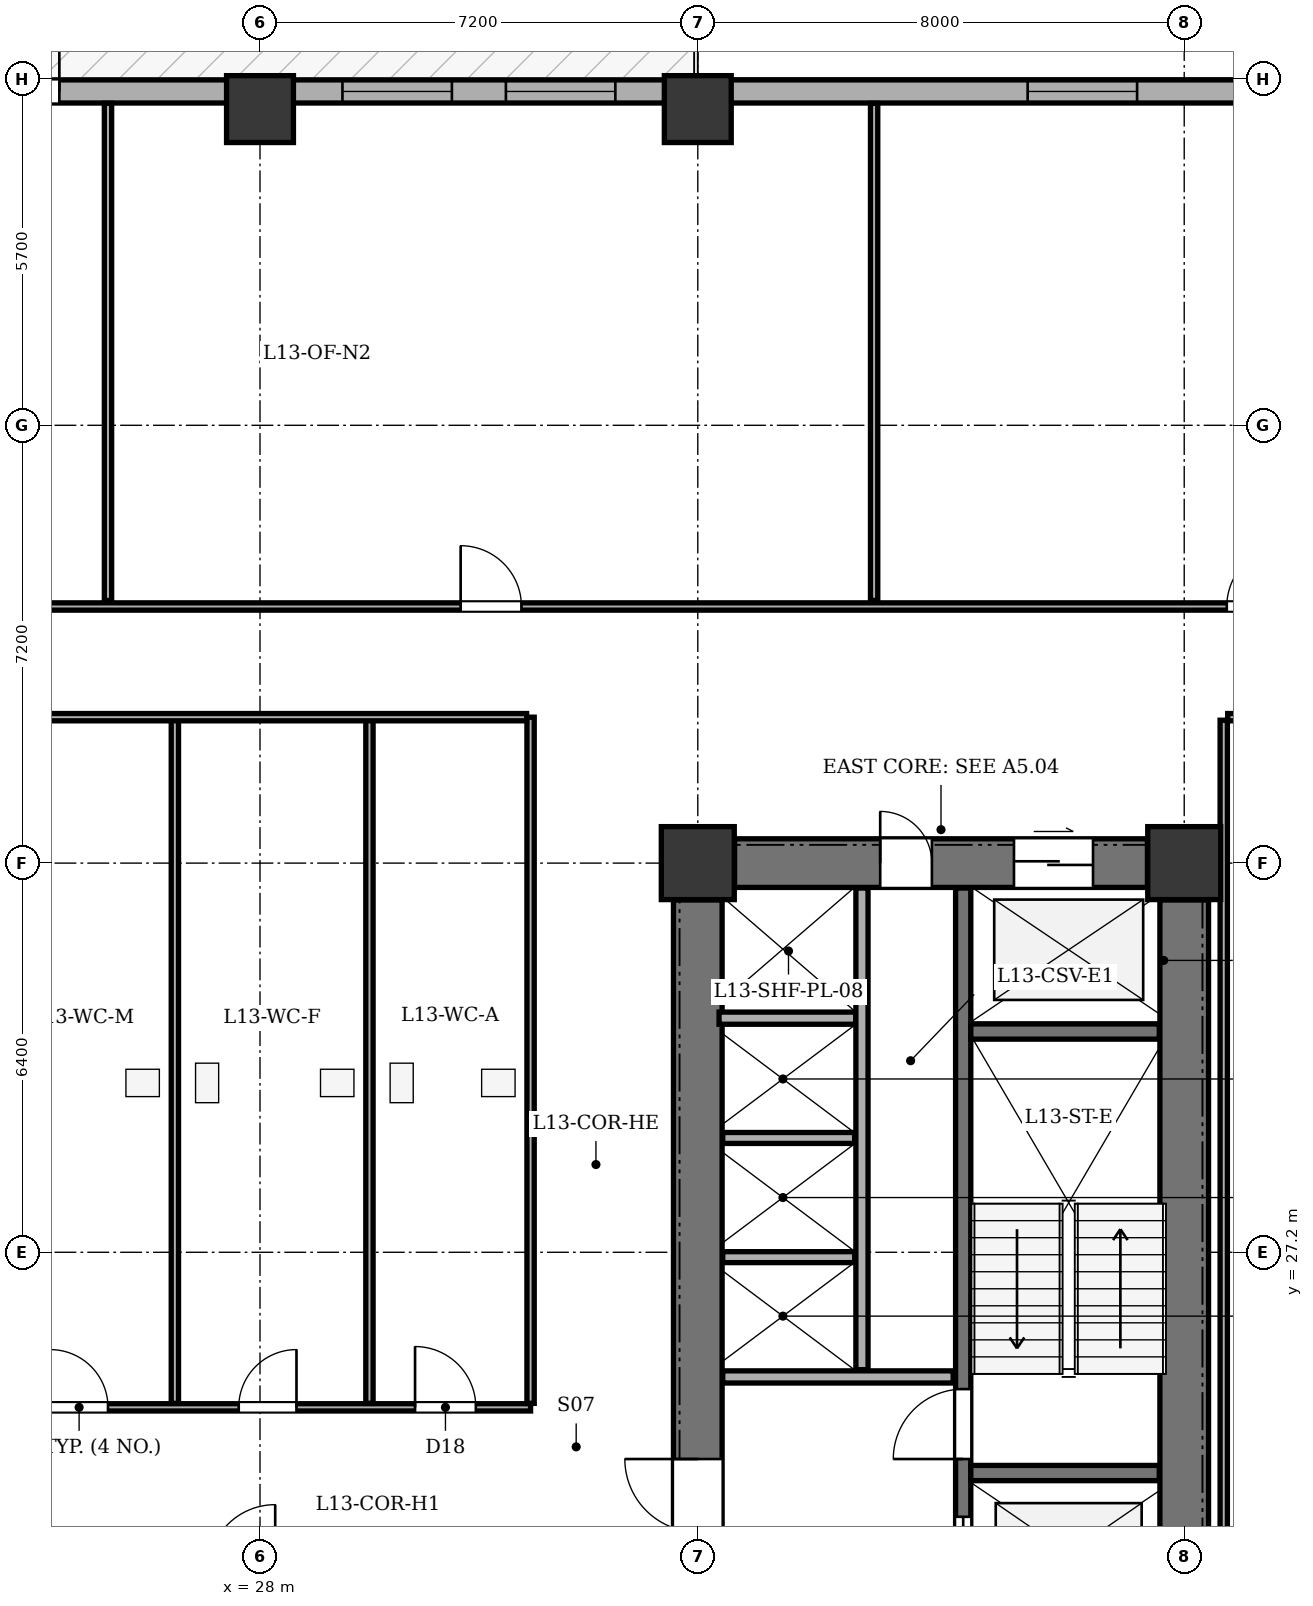
"""IFC4 building model, lengths in metres.
Left out: names, types, materials, properties, quantities, classifications, styles, units other than length and angle.
Written with IfcOpenShell. Run it as: python <this file> out.ifc"""

import sys

from ifc_helpers import new_model, si_unit, direction, frame, frame_2d, origin, origin_2d, place, context, subcontext, project, spatial, rectangle, extrude, element, fill, save


model = new_model("IFC4")
c1 = context("Model", 3, precision=1e-05, world=origin(), true_north=direction((0.0, 1.0)))
c2 = subcontext(c1, "Body", "Model", "MODEL_VIEW")
j1 = project(units=[si_unit("LENGTHUNIT", "METRE"), si_unit("PLANEANGLEUNIT", "RADIAN")], contexts=[c1])
p1 = place(None, origin())
s1 = spatial("IfcSite", under=j1, at=p1, CompositionType="ELEMENT")
p2 = place(p1, origin())
s2 = spatial("IfcBuilding", under=s1, at=p2, CompositionType="ELEMENT")
p3 = place(p2, frame((0.0, 0.0, 55.5)))
s3 = spatial("IfcBuildingStorey", under=s2, at=p3, CompositionType="ELEMENT", Elevation=55.5)
for number, where, z_axis, x_axis in (
    (1, (35.2, 33.6, 0.0), (0.0, 0.0, 1.0), (1.0, 0.0, 0.0)),
    (2, (43.2, 33.6, 0.0), (0.0, 0.0, 1.0), (1.0, 0.0, 0.0)),
):
    element("IfcColumn", number, at=place(p3, frame(where, z_axis=z_axis, x_axis=x_axis)), inside=s3, PredefinedType="COLUMN", context=c2, shape_type="SweptSolid", body=[
        extrude(rectangle(XDim=1.2, YDim=1.2, at=origin_2d()), origin(), (0.0, 0.0, 1.0), 3.9),
    ])
for number, where, z_axis, x_axis in (
    (3, (28.0, 46.0, 0.0), (0.0, 0.0, 1.0), (1.0, 0.0, 0.0)),
    (4, (35.2, 46.0, 0.0), (0.0, 0.0, 1.0), (1.0, 0.0, 0.0)),
):
    element("IfcColumn", number, at=place(p3, frame(where, z_axis=z_axis, x_axis=x_axis)), inside=s3, PredefinedType="COLUMN", context=c2, shape_type="SweptSolid", body=[
        extrude(rectangle(XDim=1.1, YDim=1.1, at=origin_2d()), origin(), (0.0, 0.0, 1.0), 3.9),
    ])
p4 = place(p3, frame((15.7, 46.29, 0.0), z_axis=(0.0, 0.0, 1.0), x_axis=(1.0, 0.0, 0.0)))
e5 = element("IfcWall", 5, at=p4, inside=s3, PredefinedType="STANDARD", context=c2, shape_type="SweptSolid", body=[
    extrude(rectangle(XDim=35.0, YDim=0.38, at=frame_2d((17.5, 0.0))), origin(), (0.0, 0.0, 1.0), 3.135),
])
p5 = place(p4, frame((8.0, 0.0, 0.0)))
e6 = element("IfcOpeningElement", 6, at=p5, cuts=e5, PredefinedType="OPENING", context=c2, shape_type="SweptSolid", body=[
    extrude(rectangle(XDim=1.0, YDim=2.02, at=frame_2d((0.5, 1.01))), frame((0.0, 0.2, 0.0), z_axis=(0.0, -1.0, 0.0), x_axis=(1.0, 0.0, 0.0)), (0.0, 0.0, 1.0), 0.4),
])
p6 = place(p4, frame((1.675, 0.0, 0.8)))
e7 = element("IfcOpeningElement", 7, at=p6, cuts=e5, PredefinedType="OPENING", context=c2, shape_type="SweptSolid", body=[
    extrude(rectangle(XDim=1.8, YDim=1.9, at=frame_2d((0.9, 0.95))), frame((0.0, 0.2, 0.0), z_axis=(0.0, -1.0, 0.0), x_axis=(1.0, 0.0, 0.0)), (0.0, 0.0, 1.0), 0.4),
])
p7 = place(p4, frame((13.656, 0.0, 0.8)))
e8 = element("IfcOpeningElement", 8, at=p7, cuts=e5, PredefinedType="OPENING", context=c2, shape_type="SweptSolid", body=[
    extrude(rectangle(XDim=1.8, YDim=1.9, at=frame_2d((0.9, 0.95))), frame((0.0, 0.2, 0.0), z_axis=(0.0, -1.0, 0.0), x_axis=(1.0, 0.0, 0.0)), (0.0, 0.0, 1.0), 0.4),
])
p8 = place(p4, frame((16.344, 0.0, 0.8)))
e9 = element("IfcOpeningElement", 9, at=p8, cuts=e5, PredefinedType="OPENING", context=c2, shape_type="SweptSolid", body=[
    extrude(rectangle(XDim=1.8, YDim=1.9, at=frame_2d((0.9, 0.95))), frame((0.0, 0.2, 0.0), z_axis=(0.0, -1.0, 0.0), x_axis=(1.0, 0.0, 0.0)), (0.0, 0.0, 1.0), 0.4),
])
p9 = place(p4, frame((24.925, 0.0, 0.8)))
e10 = element("IfcOpeningElement", 10, at=p9, cuts=e5, PredefinedType="OPENING", context=c2, shape_type="SweptSolid", body=[
    extrude(rectangle(XDim=1.8, YDim=1.9, at=frame_2d((0.9, 0.95))), frame((0.0, 0.2, 0.0), z_axis=(0.0, -1.0, 0.0), x_axis=(1.0, 0.0, 0.0)), (0.0, 0.0, 1.0), 0.4),
])
p10 = place(p4, frame((30.025, 0.0, 0.8)))
e11 = element("IfcOpeningElement", 11, at=p10, cuts=e5, PredefinedType="OPENING", context=c2, shape_type="SweptSolid", body=[
    extrude(rectangle(XDim=2.4, YDim=1.9, at=frame_2d((1.2, 0.95))), frame((0.0, 0.2, 0.0), z_axis=(0.0, -1.0, 0.0), x_axis=(1.0, 0.0, 0.0)), (0.0, 0.0, 1.0), 0.4),
])
p11 = place(p3, frame((43.2, 21.405, 0.0), z_axis=(0.0, 0.0, 1.0), x_axis=(0.0, 1.0, 0.0)))
e12 = element("IfcWall", 12, at=p11, inside=s3, PredefinedType="SHEAR", context=c2, shape_type="SweptSolid", body=[
    extrude(rectangle(XDim=11.59, YDim=0.8, at=frame_2d((5.795, 0.0))), origin(), (0.0, 0.0, 1.0), 3.6),
])
p12 = place(p3, frame((35.805, 33.6, 0.0), z_axis=(0.0, 0.0, 1.0), x_axis=(1.0, 0.0, 0.0)))
e13 = element("IfcWall", 13, at=p12, inside=s3, PredefinedType="SHEAR", context=c2, shape_type="SweptSolid", body=[
    extrude(rectangle(XDim=6.79, YDim=0.8, at=frame_2d((3.395, 0.0))), origin(), (0.0, 0.0, 1.0), 3.6),
])
p13 = place(p12, frame((4.595, 0.0, 0.0)))
e14 = element("IfcOpeningElement", 14, at=p13, cuts=e13, PredefinedType="OPENING", context=c2, shape_type="SweptSolid", body=[
    extrude(rectangle(XDim=1.3, YDim=2.15, at=frame_2d((0.65, 1.075))), frame((0.0, 0.41, 0.0), z_axis=(0.0, -1.0, 0.0), x_axis=(1.0, 0.0, 0.0)), (0.0, 0.0, 1.0), 0.82),
])
p14 = place(p12, frame((2.395, 0.0, 0.0)))
e15 = element("IfcOpeningElement", 15, at=p14, cuts=e13, PredefinedType="OPENING", context=c2, shape_type="SweptSolid", body=[
    extrude(rectangle(XDim=0.85, YDim=2.02, at=frame_2d((0.425, 1.01))), frame((0.0, 0.41, 0.0), z_axis=(0.0, -1.0, 0.0), x_axis=(1.0, 0.0, 0.0)), (0.0, 0.0, 1.0), 0.82),
])
p15 = place(p3, frame((35.2, 21.405, 0.0), z_axis=(0.0, 0.0, 1.0), x_axis=(0.0, 1.0, 0.0)))
e16 = element("IfcWall", 16, at=p15, inside=s3, PredefinedType="SHEAR", context=c2, shape_type="SweptSolid", body=[
    extrude(rectangle(XDim=11.59, YDim=0.8, at=frame_2d((5.795, 0.0))), origin(), (0.0, 0.0, 1.0), 3.6),
])
p16 = place(p15, frame((1.195, 0.0, 0.0)))
e17 = element("IfcOpeningElement", 17, at=p16, cuts=e16, PredefinedType="OPENING", context=c2, shape_type="SweptSolid", body=[
    extrude(rectangle(XDim=1.2, YDim=2.15, at=frame_2d((0.6, 1.075))), frame((0.0, 0.41, 0.0), z_axis=(0.0, -1.0, 0.0), x_axis=(1.0, 0.0, 0.0)), (0.0, 0.0, 1.0), 0.82),
])
p17 = place(p3, frame((39.565, 21.21, 0.0), z_axis=(0.0, 0.0, 1.0), x_axis=(0.0, 1.0, 0.0)))
e18 = element("IfcWall", 18, at=p17, inside=s3, PredefinedType="SHEAR", context=c2, shape_type="SweptSolid", body=[
    extrude(rectangle(XDim=11.98, YDim=0.25, at=frame_2d((5.99, 0.0))), origin(), (0.0, 0.0, 1.0), 3.6),
])
p18 = place(p17, frame((0.44, 0.0, 0.0)))
e19 = element("IfcOpeningElement", 19, at=p18, cuts=e18, PredefinedType="OPENING", context=c2, shape_type="SweptSolid", body=[
    extrude(rectangle(XDim=1.2, YDim=2.15, at=frame_2d((0.6, 1.075))), frame((0.0, 0.135, 0.0), z_axis=(0.0, -1.0, 0.0), x_axis=(1.0, 0.0, 0.0)), (0.0, 0.0, 1.0), 0.27),
])
p19 = place(p17, frame((2.59, 0.0, 0.0)))
e20 = element("IfcOpeningElement", 20, at=p19, cuts=e18, PredefinedType="OPENING", context=c2, shape_type="SweptSolid", body=[
    extrude(rectangle(XDim=1.15, YDim=2.15, at=frame_2d((0.575, 1.075))), frame((0.0, 0.135, 0.0), z_axis=(0.0, -1.0, 0.0), x_axis=(1.0, 0.0, 0.0)), (0.0, 0.0, 1.0), 0.27),
])
for number, where, z_axis, x_axis in (
    (21, (39.69, 23.57, 0.0), (0.0, 0.0, 1.0), (1.0, 0.0, 0.0)),
    (22, (39.69, 30.83, 0.0), (0.0, 0.0, 1.0), (1.0, 0.0, 0.0)),
):
    element("IfcWall", number, at=place(p3, frame(where, z_axis=z_axis, x_axis=x_axis)), inside=s3, PredefinedType="SHEAR", context=c2, shape_type="SweptSolid", body=[
        extrude(rectangle(XDim=3.1, YDim=0.25, at=frame_2d((1.55, 0.0))), origin(), (0.0, 0.0, 1.0), 3.6),
    ])
p20 = place(p3, frame((35.61, 25.15, 0.0), z_axis=(0.0, 0.0, 1.0), x_axis=(1.0, 0.0, 0.0)))
e23 = element("IfcWall", 23, at=p20, inside=s3, PredefinedType="SOLIDWALL", context=c2, shape_type="SweptSolid", body=[
    extrude(rectangle(XDim=3.79, YDim=0.2, at=frame_2d((1.895, 0.0))), origin(), (0.0, 0.0, 1.0), 3.6),
])
p21 = place(p3, frame((35.55, 31.05, 0.0), z_axis=(0.0, 0.0, 1.0), x_axis=(1.0, 0.0, 0.0)))
e24 = element("IfcWall", 24, at=p21, inside=s3, PredefinedType="SOLIDWALL", context=c2, shape_type="SweptSolid", body=[
    extrude(rectangle(XDim=2.25, YDim=0.2, at=frame_2d((1.125, 0.0))), origin(), (0.0, 0.0, 1.0), 3.6),
])
p22 = place(p3, frame((37.9, 25.27, 0.0), z_axis=(0.0, 0.0, 1.0), x_axis=(0.0, 1.0, 0.0)))
e25 = element("IfcWall", 25, at=p22, inside=s3, PredefinedType="SOLIDWALL", context=c2, shape_type="SweptSolid", body=[
    extrude(rectangle(XDim=7.92, YDim=0.2, at=frame_2d((3.96, 0.0))), origin(), (0.0, 0.0, 1.0), 3.6),
])
for number, where, z_axis, x_axis in (
    (26, (35.61, 27.12, 0.0), (0.0, 0.0, 1.0), (1.0, 0.0, 0.0)),
    (27, (35.61, 29.08, 0.0), (0.0, 0.0, 1.0), (1.0, 0.0, 0.0)),
):
    element("IfcWall", number, at=place(p3, frame(where, z_axis=z_axis, x_axis=x_axis)), inside=s3, PredefinedType="PARTITIONING", context=c2, shape_type="SweptSolid", body=[
        extrude(rectangle(XDim=2.17, YDim=0.18, at=frame_2d((1.085, 0.0))), origin(), (0.0, 0.0, 1.0), 3.6),
    ])
p23 = place(p3, frame((23.55, 24.65, 0.0), z_axis=(0.0, 0.0, 1.0), x_axis=(1.0, 0.0, 0.0)))
e28 = element("IfcWall", 28, at=p23, inside=s3, PredefinedType="PARTITIONING", context=c2, shape_type="SweptSolid", body=[
    extrude(rectangle(XDim=8.9, YDim=0.12, at=frame_2d((4.45, 0.0))), origin(), (0.0, 0.0, 1.0), 3.135),
])
p24 = place(p23, frame((1.0, 0.0, 0.0)))
e29 = element("IfcOpeningElement", 29, at=p24, cuts=e28, PredefinedType="OPENING", context=c2, shape_type="SweptSolid", body=[
    extrude(rectangle(XDim=0.95, YDim=2.1, at=frame_2d((0.475, 1.05))), frame((0.0, 0.07, 0.0), z_axis=(0.0, -1.0, 0.0), x_axis=(1.0, 0.0, 0.0)), (0.0, 0.0, 1.0), 0.14),
])
p25 = place(p23, frame((4.1, 0.0, 0.0)))
e30 = element("IfcOpeningElement", 30, at=p25, cuts=e28, PredefinedType="OPENING", context=c2, shape_type="SweptSolid", body=[
    extrude(rectangle(XDim=0.95, YDim=2.1, at=frame_2d((0.475, 1.05))), frame((0.0, 0.07, 0.0), z_axis=(0.0, -1.0, 0.0), x_axis=(1.0, 0.0, 0.0)), (0.0, 0.0, 1.0), 0.14),
])
p26 = place(p23, frame((7.0, 0.0, 0.0)))
e31 = element("IfcOpeningElement", 31, at=p26, cuts=e28, PredefinedType="OPENING", context=c2, shape_type="SweptSolid", body=[
    extrude(rectangle(XDim=1.0, YDim=2.1, at=frame_2d((0.5, 1.05))), frame((0.0, 0.07, 0.0), z_axis=(0.0, -1.0, 0.0), x_axis=(1.0, 0.0, 0.0)), (0.0, 0.0, 1.0), 0.14),
])
for number, where, z_axis, x_axis in (
    (32, (32.45, 24.715, 0.0), (0.0, 0.0, 1.0), (0.0, 1.0, 0.0)),
    (33, (26.6, 24.715, 0.0), (0.0, 0.0, 1.0), (0.0, 1.0, 0.0)),
):
    element("IfcWall", number, at=place(p3, frame(where, z_axis=z_axis, x_axis=x_axis)), inside=s3, PredefinedType="PARTITIONING", context=c2, shape_type="SweptSolid", body=[
        extrude(rectangle(XDim=11.285, YDim=0.12, at=frame_2d((5.643, 0.0))), origin(), (0.0, 0.0, 1.0), 3.6),
    ])
p27 = place(p3, frame((29.8, 24.715, 0.0), z_axis=(0.0, 0.0, 1.0), x_axis=(0.0, 1.0, 0.0)))
e34 = element("IfcWall", 34, at=p27, inside=s3, PredefinedType="PARTITIONING", context=c2, shape_type="SweptSolid", body=[
    extrude(rectangle(XDim=11.285, YDim=0.12, at=frame_2d((5.643, 0.0))), origin(), (0.0, 0.0, 1.0), 3.135),
])
p28 = place(p3, frame((23.615, 36.0, 0.0), z_axis=(0.0, 0.0, 1.0), x_axis=(1.0, 0.0, 0.0)))
e35 = element("IfcWall", 35, at=p28, inside=s3, PredefinedType="PARTITIONING", context=c2, shape_type="SweptSolid", body=[
    extrude(rectangle(XDim=8.77, YDim=0.12, at=frame_2d((4.385, 0.0))), origin(), (0.0, 0.0, 1.0), 3.6),
])
p29 = place(p3, frame((15.7, 37.82, 0.0), z_axis=(0.0, 0.0, 1.0), x_axis=(1.0, 0.0, 0.0)))
e36 = element("IfcWall", 36, at=p29, inside=s3, PredefinedType="PARTITIONING", context=c2, shape_type="SweptSolid", body=[
    extrude(rectangle(XDim=35.0, YDim=0.12, at=frame_2d((17.5, 0.0))), origin(), (0.0, 0.0, 1.0), 3.6),
])
p30 = place(p29, frame((4.4, 0.0, 0.0)))
e37 = element("IfcOpeningElement", 37, at=p30, cuts=e36, PredefinedType="OPENING", context=c2, shape_type="SweptSolid", body=[
    extrude(rectangle(XDim=1.0, YDim=2.1, at=frame_2d((0.5, 1.05))), frame((0.0, 0.07, 0.0), z_axis=(0.0, -1.0, 0.0), x_axis=(1.0, 0.0, 0.0)), (0.0, 0.0, 1.0), 0.14),
])
p31 = place(p29, frame((15.6, 0.0, 0.0)))
e38 = element("IfcOpeningElement", 38, at=p31, cuts=e36, PredefinedType="OPENING", context=c2, shape_type="SweptSolid", body=[
    extrude(rectangle(XDim=1.0, YDim=2.1, at=frame_2d((0.5, 1.05))), frame((0.0, 0.07, 0.0), z_axis=(0.0, -1.0, 0.0), x_axis=(1.0, 0.0, 0.0)), (0.0, 0.0, 1.0), 0.14),
])
p32 = place(p29, frame((28.2, 0.0, 0.0)))
e39 = element("IfcOpeningElement", 39, at=p32, cuts=e36, PredefinedType="OPENING", context=c2, shape_type="SweptSolid", body=[
    extrude(rectangle(XDim=1.0, YDim=2.1, at=frame_2d((0.5, 1.05))), frame((0.0, 0.07, 0.0), z_axis=(0.0, -1.0, 0.0), x_axis=(1.0, 0.0, 0.0)), (0.0, 0.0, 1.0), 0.14),
])
for number, where, z_axis, x_axis in (
    (40, (25.5, 37.92, 0.0), (0.0, 0.0, 1.0), (0.0, 1.0, 0.0)),
    (41, (38.1, 37.92, 0.0), (0.0, 0.0, 1.0), (0.0, 1.0, 0.0)),
):
    element("IfcWall", number, at=place(p3, frame(where, z_axis=z_axis, x_axis=x_axis)), inside=s3, PredefinedType="PARTITIONING", context=c2, shape_type="SweptSolid", body=[
        extrude(rectangle(XDim=8.175, YDim=0.12, at=frame_2d((4.087, 0.0))), origin(), (0.0, 0.0, 1.0), 3.6),
    ])
p33 = place(p3, frame((43.85, 18.45, 0.0), z_axis=(0.0, 0.0, 1.0), x_axis=(0.0, 1.0, 0.0)))
e42 = element("IfcWall", 42, at=p33, inside=s3, PredefinedType="PARTITIONING", context=c2, shape_type="SweptSolid", body=[
    extrude(rectangle(XDim=17.5, YDim=0.12, at=frame_2d((8.75, 0.0))), origin(), (0.0, 0.0, 1.0), 3.6),
])
p34 = place(p3, frame((43.915, 36.0, 0.0), z_axis=(0.0, 0.0, 1.0), x_axis=(1.0, 0.0, 0.0)))
e43 = element("IfcWall", 43, at=p34, inside=s3, PredefinedType="PARTITIONING", context=c2, shape_type="SweptSolid", body=[
    extrude(rectangle(XDim=11.38, YDim=0.12, at=frame_2d((5.69, 0.0))), origin(), (0.0, 0.0, 1.0), 3.6),
])
p35 = place(p34, frame((1.485, 0.0, 0.0)))
e44 = element("IfcOpeningElement", 44, at=p35, cuts=e43, PredefinedType="OPENING", context=c2, shape_type="SweptSolid", body=[
    extrude(rectangle(XDim=0.95, YDim=2.1, at=frame_2d((0.475, 1.05))), frame((0.0, 0.07, 0.0), z_axis=(0.0, -1.0, 0.0), x_axis=(1.0, 0.0, 0.0)), (0.0, 0.0, 1.0), 0.14),
])
p36 = place(p5, origin())
e45 = element("IfcDoor", 45, at=p36, inside=s3, OperationType="SINGLE_SWING_RIGHT", PredefinedType="DOOR", context=c2, shape_type="SweptSolid", body=[
    extrude(rectangle(XDim=1.0, YDim=2.02, at=frame_2d((0.5, 1.01))), frame((0.0, 0.025, 0.0), z_axis=(0.0, -1.0, 0.0), x_axis=(1.0, 0.0, 0.0)), (0.0, 0.0, 1.0), 0.05),
])
fill(e6, e45)
p37 = place(p7, origin())
e46 = element("IfcWindow", 46, at=p37, inside=s3, PartitioningType="SINGLE_PANEL", PredefinedType="WINDOW", context=c2, shape_type="SweptSolid", body=[
    extrude(rectangle(XDim=1.8, YDim=1.9, at=frame_2d((0.9, 0.95))), frame((0.0, -0.01, 0.0), z_axis=(0.0, -1.0, 0.0), x_axis=(1.0, 0.0, 0.0)), (0.0, 0.0, 1.0), 0.06),
])
fill(e8, e46)
p38 = place(p8, origin())
e47 = element("IfcWindow", 47, at=p38, inside=s3, PartitioningType="SINGLE_PANEL", PredefinedType="WINDOW", context=c2, shape_type="SweptSolid", body=[
    extrude(rectangle(XDim=1.8, YDim=1.9, at=frame_2d((0.9, 0.95))), frame((0.0, -0.01, 0.0), z_axis=(0.0, -1.0, 0.0), x_axis=(1.0, 0.0, 0.0)), (0.0, 0.0, 1.0), 0.06),
])
fill(e9, e47)
p39 = place(p9, origin())
e48 = element("IfcWindow", 48, at=p39, inside=s3, PartitioningType="SINGLE_PANEL", PredefinedType="WINDOW", context=c2, shape_type="SweptSolid", body=[
    extrude(rectangle(XDim=1.8, YDim=1.9, at=frame_2d((0.9, 0.95))), frame((0.0, -0.01, 0.0), z_axis=(0.0, -1.0, 0.0), x_axis=(1.0, 0.0, 0.0)), (0.0, 0.0, 1.0), 0.06),
])
fill(e10, e48)
p40 = place(p13, origin())
e49 = element("IfcDoor", 49, at=p40, inside=s3, OperationType="DOUBLE_DOOR_SLIDING", PredefinedType="DOOR", context=c2, shape_type="SweptSolid", body=[
    extrude(rectangle(XDim=1.3, YDim=2.15, at=frame_2d((0.65, 1.075))), frame((0.0, 0.025, 0.0), z_axis=(0.0, -1.0, 0.0), x_axis=(1.0, 0.0, 0.0)), (0.0, 0.0, 1.0), 0.05),
])
fill(e14, e49)
p41 = place(p14, origin())
e50 = element("IfcDoor", 50, at=p41, inside=s3, OperationType="SINGLE_SWING_LEFT", PredefinedType="DOOR", context=c2, shape_type="SweptSolid", body=[
    extrude(rectangle(XDim=0.85, YDim=2.02, at=frame_2d((0.425, 1.01))), frame((0.0, 0.025, 0.0), z_axis=(0.0, -1.0, 0.0), x_axis=(1.0, 0.0, 0.0)), (0.0, 0.0, 1.0), 0.05),
])
fill(e15, e50)
p42 = place(p16, origin())
e51 = element("IfcDoor", 51, at=p42, inside=s3, OperationType="SINGLE_SWING_RIGHT", PredefinedType="DOOR", context=c2, shape_type="SweptSolid", body=[
    extrude(rectangle(XDim=1.2, YDim=2.15, at=frame_2d((0.6, 1.075))), frame((0.0, 0.025, 0.0), z_axis=(0.0, -1.0, 0.0), x_axis=(1.0, 0.0, 0.0)), (0.0, 0.0, 1.0), 0.05),
])
fill(e17, e51)
p43 = place(p18, origin())
e52 = element("IfcDoor", 52, at=p43, inside=s3, OperationType="DOUBLE_DOOR_SLIDING", PredefinedType="DOOR", context=c2, shape_type="SweptSolid", body=[
    extrude(rectangle(XDim=1.2, YDim=2.15, at=frame_2d((0.6, 1.075))), frame((0.0, 0.025, 0.0), z_axis=(0.0, -1.0, 0.0), x_axis=(1.0, 0.0, 0.0)), (0.0, 0.0, 1.0), 0.05),
])
fill(e19, e52)
p44 = place(p19, origin())
e53 = element("IfcDoor", 53, at=p44, inside=s3, OperationType="SINGLE_SWING_LEFT", PredefinedType="DOOR", context=c2, shape_type="SweptSolid", body=[
    extrude(rectangle(XDim=1.15, YDim=2.15, at=frame_2d((0.575, 1.075))), frame((0.0, 0.025, 0.0), z_axis=(0.0, -1.0, 0.0), x_axis=(1.0, 0.0, 0.0)), (0.0, 0.0, 1.0), 0.05),
])
fill(e20, e53)
p45 = place(p24, origin())
e54 = element("IfcDoor", 54, at=p45, inside=s3, OperationType="SINGLE_SWING_LEFT", PredefinedType="DOOR", context=c2, shape_type="SweptSolid", body=[
    extrude(rectangle(XDim=0.95, YDim=2.1, at=frame_2d((0.475, 1.05))), frame((0.0, 0.025, 0.0), z_axis=(0.0, -1.0, 0.0), x_axis=(1.0, 0.0, 0.0)), (0.0, 0.0, 1.0), 0.05),
])
fill(e29, e54)
p46 = place(p25, origin())
e55 = element("IfcDoor", 55, at=p46, inside=s3, OperationType="SINGLE_SWING_RIGHT", PredefinedType="DOOR", context=c2, shape_type="SweptSolid", body=[
    extrude(rectangle(XDim=0.95, YDim=2.1, at=frame_2d((0.475, 1.05))), frame((0.0, 0.025, 0.0), z_axis=(0.0, -1.0, 0.0), x_axis=(1.0, 0.0, 0.0)), (0.0, 0.0, 1.0), 0.05),
])
fill(e30, e55)
p47 = place(p26, origin())
e56 = element("IfcDoor", 56, at=p47, inside=s3, OperationType="SINGLE_SWING_LEFT", PredefinedType="DOOR", context=c2, shape_type="SweptSolid", body=[
    extrude(rectangle(XDim=1.0, YDim=2.1, at=frame_2d((0.5, 1.05))), frame((0.0, 0.025, 0.0), z_axis=(0.0, -1.0, 0.0), x_axis=(1.0, 0.0, 0.0)), (0.0, 0.0, 1.0), 0.05),
])
fill(e31, e56)
p48 = place(p31, origin())
e57 = element("IfcDoor", 57, at=p48, inside=s3, OperationType="SINGLE_SWING_LEFT", PredefinedType="DOOR", context=c2, shape_type="SweptSolid", body=[
    extrude(rectangle(XDim=1.0, YDim=2.1, at=frame_2d((0.5, 1.05))), frame((0.0, 0.025, 0.0), z_axis=(0.0, -1.0, 0.0), x_axis=(1.0, 0.0, 0.0)), (0.0, 0.0, 1.0), 0.05),
])
fill(e38, e57)
p49 = place(p32, origin())
e58 = element("IfcDoor", 58, at=p49, inside=s3, OperationType="SINGLE_SWING_RIGHT", PredefinedType="DOOR", context=c2, shape_type="SweptSolid", body=[
    extrude(rectangle(XDim=1.0, YDim=2.1, at=frame_2d((0.5, 1.05))), frame((0.0, 0.025, 0.0), z_axis=(0.0, -1.0, 0.0), x_axis=(1.0, 0.0, 0.0)), (0.0, 0.0, 1.0), 0.05),
])
fill(e39, e58)
save(model, sys.argv[1])
